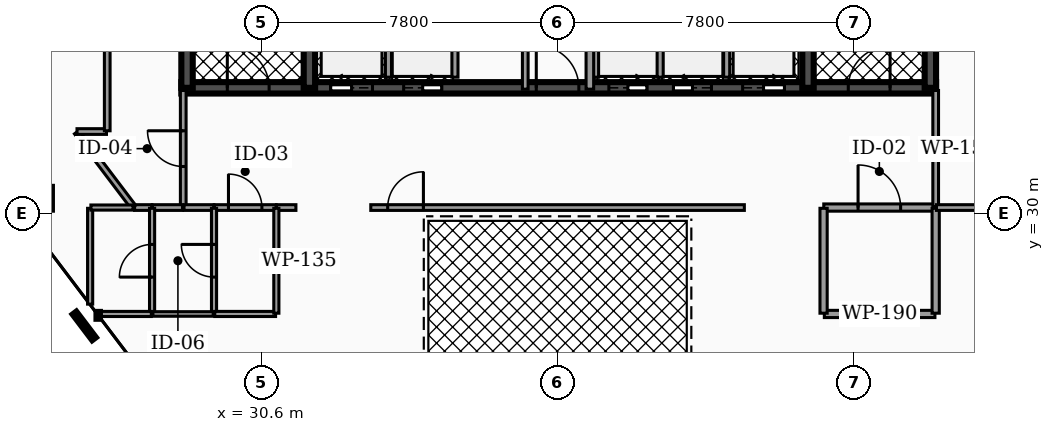
"""IFC4 building model, lengths in metres.
Left out: names, types, materials, properties, quantities, classifications, styles, units other than length and angle.
Written with IfcOpenShell. Run it as: python <this file> out.ifc"""

import sys

from ifc_helpers import new_model, si_unit, direction, frame, frame_2d, origin, place, context, subcontext, project, spatial, rectangle, extrude, element, fill, save


model = new_model("IFC4")
c1 = context("Model", 3, precision=1e-05, world=origin(), true_north=direction((0.0, 1.0)))
c2 = subcontext(c1, "Body", "Model", "MODEL_VIEW")
j1 = project(units=[si_unit("LENGTHUNIT", "METRE"), si_unit("PLANEANGLEUNIT", "RADIAN")], contexts=[c1])
p1 = place(None, origin())
s1 = spatial("IfcSite", under=j1, at=p1, CompositionType="ELEMENT")
p2 = place(p1, origin())
s2 = spatial("IfcBuilding", under=s1, at=p2, CompositionType="ELEMENT")
p3 = place(p2, frame((0.0, 0.0, 242.76)))
s3 = spatial("IfcBuildingStorey", under=s2, at=p3, CompositionType="ELEMENT", Elevation=242.76)
p4 = place(p3, frame((28.5, 33.3, 0.0), z_axis=(0.0, 0.0, 1.0), x_axis=(1.0, 0.0, 0.0)))
e1 = element("IfcWall", 1, at=p4, inside=s3, PredefinedType="SHEAR", context=c2, shape_type="SweptSolid", body=[
    extrude(rectangle(XDim=19.86, YDim=0.3, at=frame_2d((9.93, 0.0))), origin(), (0.0, 0.0, 1.0), 3.18),
])
p5 = place(p4, frame((3.93, 0.0, 0.0)))
e2 = element("IfcOpeningElement", 2, at=p5, cuts=e1, PredefinedType="OPENING", context=c2, shape_type="SweptSolid", body=[
    extrude(rectangle(XDim=1.1, YDim=2.15, at=frame_2d((0.55, 1.075))), frame((0.0, 0.16, 0.0), z_axis=(0.0, -1.0, 0.0), x_axis=(1.0, 0.0, 0.0)), (0.0, 0.0, 1.0), 0.32),
])
p6 = place(p4, frame((14.77, 0.0, 0.0)))
e3 = element("IfcOpeningElement", 3, at=p6, cuts=e1, PredefinedType="OPENING", context=c2, shape_type="SweptSolid", body=[
    extrude(rectangle(XDim=1.1, YDim=2.15, at=frame_2d((0.55, 1.075))), frame((0.0, 0.16, 0.0), z_axis=(0.0, -1.0, 0.0), x_axis=(1.0, 0.0, 0.0)), (0.0, 0.0, 1.0), 0.32),
])
p7 = place(p4, frame((11.25, 0.0, 0.0)))
e4 = element("IfcOpeningElement", 4, at=p7, cuts=e1, PredefinedType="OPENING", context=c2, shape_type="SweptSolid", body=[
    extrude(rectangle(XDim=1.0, YDim=2.1, at=frame_2d((0.5, 1.05))), frame((0.0, 0.16, 0.0), z_axis=(0.0, -1.0, 0.0), x_axis=(1.0, 0.0, 0.0)), (0.0, 0.0, 1.0), 0.32),
])
p8 = place(p4, frame((12.95, 0.0, 0.0)))
e5 = element("IfcOpeningElement", 5, at=p8, cuts=e1, PredefinedType="OPENING", context=c2, shape_type="SweptSolid", body=[
    extrude(rectangle(XDim=1.0, YDim=2.1, at=frame_2d((0.5, 1.05))), frame((0.0, 0.16, 0.0), z_axis=(0.0, -1.0, 0.0), x_axis=(1.0, 0.0, 0.0)), (0.0, 0.0, 1.0), 0.32),
])
p9 = place(p4, frame((5.85, 0.0, 0.0)))
e6 = element("IfcOpeningElement", 6, at=p9, cuts=e1, PredefinedType="OPENING", context=c2, shape_type="SweptSolid", body=[
    extrude(rectangle(XDim=1.0, YDim=2.1, at=frame_2d((0.5, 1.05))), frame((0.0, 0.16, 0.0), z_axis=(0.0, -1.0, 0.0), x_axis=(1.0, 0.0, 0.0)), (0.0, 0.0, 1.0), 0.32),
])
p10 = place(p4, frame((1.21, 0.0, 0.0)))
e7 = element("IfcOpeningElement", 7, at=p10, cuts=e1, PredefinedType="OPENING", context=c2, shape_type="SweptSolid", body=[
    extrude(rectangle(XDim=1.1, YDim=2.2, at=frame_2d((0.55, 1.1))), frame((0.0, 0.16, 0.0), z_axis=(0.0, -1.0, 0.0), x_axis=(1.0, 0.0, 0.0)), (0.0, 0.0, 1.0), 0.32),
])
p11 = place(p4, frame((9.34, 0.0, 0.0)))
e8 = element("IfcOpeningElement", 8, at=p11, cuts=e1, PredefinedType="OPENING", context=c2, shape_type="SweptSolid", body=[
    extrude(rectangle(XDim=1.12, YDim=2.05, at=frame_2d((0.56, 1.025))), frame((0.0, 0.16, 0.0), z_axis=(0.0, -1.0, 0.0), x_axis=(1.0, 0.0, 0.0)), (0.0, 0.0, 1.0), 0.32),
])
p12 = place(p4, frame((17.55, 0.0, 0.0)))
e9 = element("IfcOpeningElement", 9, at=p12, cuts=e1, PredefinedType="OPENING", context=c2, shape_type="SweptSolid", body=[
    extrude(rectangle(XDim=1.1, YDim=2.2, at=frame_2d((0.55, 1.1))), frame((0.0, 0.16, 0.0), z_axis=(0.0, -1.0, 0.0), x_axis=(1.0, 0.0, 0.0)), (0.0, 0.0, 1.0), 0.32),
])
for number, where, z_axis, x_axis in (
    (10, (28.65, 33.3, 0.0), (0.0, 0.0, 1.0), (0.0, 1.0, 0.0)),
    (11, (31.87, 33.3, 0.0), (0.0, 0.0, 1.0), (0.0, 1.0, 0.0)),
    (12, (44.99, 33.3, 0.0), (0.0, 0.0, 1.0), (0.0, 1.0, 0.0)),
    (13, (48.21, 33.3, 0.0), (0.0, 0.0, 1.0), (0.0, 1.0, 0.0)),
):
    element("IfcWall", number, at=place(p3, frame(where, z_axis=z_axis, x_axis=x_axis)), inside=s3, PredefinedType="SHEAR", context=c2, shape_type="SweptSolid", body=[
        extrude(rectangle(XDim=10.1, YDim=0.3, at=frame_2d((5.05, 0.0))), origin(), (0.0, 0.0, 1.0), 3.18),
    ])
for number, where, z_axis, x_axis in (
    (14, (33.95, 33.58, 0.0), (0.0, 0.0, 1.0), (0.0, 1.0, 0.0)),
    (15, (42.85, 33.58, 0.0), (0.0, 0.0, 1.0), (0.0, 1.0, 0.0)),
):
    element("IfcWall", number, at=place(p3, frame(where, z_axis=z_axis, x_axis=x_axis)), inside=s3, PredefinedType="SOLIDWALL", context=c2, shape_type="SweptSolid", body=[
        extrude(rectangle(XDim=2.45, YDim=0.16, at=frame_2d((1.225, 0.0))), origin(), (0.0, 0.0, 1.0), 3.18),
    ])
for number, where, z_axis, x_axis in (
    (16, (39.4, 33.58, 0.0), (0.0, 0.0, 1.0), (0.0, 1.0, 0.0)),
    (17, (41.1, 33.58, 0.0), (0.0, 0.0, 1.0), (0.0, 1.0, 0.0)),
    (18, (35.7, 33.58, 0.0), (0.0, 0.0, 1.0), (0.0, 1.0, 0.0)),
):
    element("IfcWall", number, at=place(p3, frame(where, z_axis=z_axis, x_axis=x_axis)), inside=s3, PredefinedType="SOLIDWALL", context=c2, shape_type="SweptSolid", body=[
        extrude(rectangle(XDim=2.25, YDim=0.16, at=frame_2d((1.125, 0.0))), origin(), (0.0, 0.0, 1.0), 3.18),
    ])
p13 = place(p3, frame((37.55, 33.265, 0.0), z_axis=(0.0, 0.0, 1.0), x_axis=(0.0, 1.0, 0.0)))
e19 = element("IfcWall", 19, at=p13, inside=s3, PredefinedType="PARTITIONING", context=c2, shape_type="SweptSolid", body=[
    extrude(rectangle(XDim=3.615, YDim=0.15, at=frame_2d((1.808, 0.0))), origin(), (0.0, 0.0, 1.0), 2.235),
])
p14 = place(p13, frame((1.337, 0.0, 0.0)))
e20 = element("IfcOpeningElement", 20, at=p14, cuts=e19, PredefinedType="OPENING", context=c2, shape_type="SweptSolid", body=[
    extrude(rectangle(XDim=0.94, YDim=2.05, at=frame_2d((0.47, 1.025))), frame((0.0, 0.085, 0.0), z_axis=(0.0, -1.0, 0.0), x_axis=(1.0, 0.0, 0.0)), (0.0, 0.0, 1.0), 0.17),
])
p15 = place(p3, frame((39.25, 33.265, 0.0), z_axis=(0.0, 0.0, 1.0), x_axis=(0.0, 1.0, 0.0)))
e21 = element("IfcWall", 21, at=p15, inside=s3, PredefinedType="PARTITIONING", context=c2, shape_type="SweptSolid", body=[
    extrude(rectangle(XDim=3.615, YDim=0.2, at=frame_2d((1.808, 0.0))), origin(), (0.0, 0.0, 1.0), 2.235),
])
p16 = place(p3, frame((45.405, 30.15, 0.0), z_axis=(0.0, 0.0, 1.0), x_axis=(1.0, 0.0, 0.0)))
e22 = element("IfcWall", 22, at=p16, inside=s3, PredefinedType="PARTITIONING", context=c2, shape_type="SweptSolid", body=[
    extrude(rectangle(XDim=2.925, YDim=0.19, at=frame_2d((1.462, 0.0))), origin(), (0.0, 0.0, 1.0), 2.235),
])
p17 = place(p16, frame((0.903, 0.0, 0.0)))
e23 = element("IfcOpeningElement", 23, at=p17, cuts=e22, PredefinedType="OPENING", context=c2, shape_type="SweptSolid", body=[
    extrude(rectangle(XDim=1.12, YDim=2.05, at=frame_2d((0.56, 1.025))), frame((0.0, 0.105, 0.0), z_axis=(0.0, -1.0, 0.0), x_axis=(1.0, 0.0, 0.0)), (0.0, 0.0, 1.0), 0.21),
])
p18 = place(p3, frame((28.55, 30.17, 0.0), z_axis=(0.0, 0.0, 1.0), x_axis=(0.0, 1.0, 0.0)))
e24 = element("IfcWall", 24, at=p18, inside=s3, PredefinedType="PARTITIONING", context=c2, shape_type="SweptSolid", body=[
    extrude(rectangle(XDim=3.06, YDim=0.15, at=frame_2d((1.53, 0.0))), origin(), (0.0, 0.0, 1.0), 2.235),
])
p19 = place(p18, frame((1.06, 0.0, 0.0)))
e25 = element("IfcOpeningElement", 25, at=p19, cuts=e24, PredefinedType="OPENING", context=c2, shape_type="SweptSolid", body=[
    extrude(rectangle(XDim=0.94, YDim=2.05, at=frame_2d((0.47, 1.025))), frame((0.0, 0.085, 0.0), z_axis=(0.0, -1.0, 0.0), x_axis=(1.0, 0.0, 0.0)), (0.0, 0.0, 1.0), 0.17),
])
p20 = place(p3, frame((48.35, 30.17, 0.0), z_axis=(0.0, 0.0, 1.0), x_axis=(0.0, 1.0, 0.0)))
e26 = element("IfcWall", 26, at=p20, inside=s3, PredefinedType="PARTITIONING", context=c2, shape_type="SweptSolid", body=[
    extrude(rectangle(XDim=3.06, YDim=0.15, at=frame_2d((1.53, 0.0))), origin(), (0.0, 0.0, 1.0), 2.235),
])
p21 = place(p3, frame((29.365, 30.15, 0.0), z_axis=(0.0, 0.0, 1.0), x_axis=(1.0, 0.0, 0.0)))
e27 = element("IfcWall", 27, at=p21, inside=s3, PredefinedType="PARTITIONING", context=c2, shape_type="SweptSolid", body=[
    extrude(rectangle(XDim=1.63, YDim=0.15, at=frame_2d((0.815, 0.0))), origin(), (0.0, 0.0, 1.0), 2.235),
])
p22 = place(p21, frame((0.375, 0.0, 0.0)))
e28 = element("IfcOpeningElement", 28, at=p22, cuts=e27, PredefinedType="OPENING", context=c2, shape_type="SweptSolid", body=[
    extrude(rectangle(XDim=0.88, YDim=2.05, at=frame_2d((0.44, 1.025))), frame((0.0, 0.085, 0.0), z_axis=(0.0, -1.0, 0.0), x_axis=(1.0, 0.0, 0.0)), (0.0, 0.0, 1.0), 0.17),
])
p23 = place(p3, frame((28.57, 30.15, 0.0), z_axis=(0.0, 0.0, 1.0), x_axis=(1.0, 0.0, 0.0)))
e29 = element("IfcWall", 29, at=p23, inside=s3, PredefinedType="PARTITIONING", context=c2, shape_type="SweptSolid", body=[
    extrude(rectangle(XDim=0.785, YDim=0.15, at=frame_2d((0.393, 0.0))), origin(), (0.0, 0.0, 1.0), 2.235),
])
p24 = place(p3, frame((33.485, 30.15, 0.0), z_axis=(0.0, 0.0, 1.0), x_axis=(1.0, 0.0, 0.0)))
e30 = element("IfcWall", 30, at=p24, inside=s3, PredefinedType="PARTITIONING", context=c2, shape_type="SweptSolid", body=[
    extrude(rectangle(XDim=9.83, YDim=0.15, at=frame_2d((4.915, 0.0))), origin(), (0.0, 0.0, 1.0), 2.235),
])
p25 = place(p24, frame((0.445, 0.0, 0.0)))
e31 = element("IfcOpeningElement", 31, at=p25, cuts=e30, PredefinedType="OPENING", context=c2, shape_type="SweptSolid", body=[
    extrude(rectangle(XDim=0.94, YDim=2.05, at=frame_2d((0.47, 1.025))), frame((0.0, 0.085, 0.0), z_axis=(0.0, -1.0, 0.0), x_axis=(1.0, 0.0, 0.0)), (0.0, 0.0, 1.0), 0.17),
])
p26 = place(p3, frame((31.005, 30.15, 0.0), z_axis=(0.0, 0.0, 1.0), x_axis=(1.0, 0.0, 0.0)))
e32 = element("IfcWall", 32, at=p26, inside=s3, PredefinedType="PARTITIONING", context=c2, shape_type="SweptSolid", body=[
    extrude(rectangle(XDim=0.51, YDim=0.15, at=frame_2d((0.255, 0.0))), origin(), (0.0, 0.0, 1.0), 2.235),
])
p27 = place(p3, frame((45.42, 27.35, 0.0), z_axis=(0.0, 0.0, 1.0), x_axis=(1.0, 0.0, 0.0)))
e33 = element("IfcWall", 33, at=p27, inside=s3, PredefinedType="PARTITIONING", context=c2, shape_type="SweptSolid", body=[
    extrude(rectangle(XDim=2.91, YDim=0.19, at=frame_2d((1.455, 0.0))), origin(), (0.0, 0.0, 1.0), 2.235),
])
for number, where, z_axis, x_axis in (
    (34, (45.4, 27.37, 0.0), (0.0, 0.0, 1.0), (0.0, 1.0, 0.0)),
    (35, (48.35, 27.37, 0.0), (0.0, 0.0, 1.0), (0.0, 1.0, 0.0)),
):
    element("IfcWall", number, at=place(p3, frame(where, z_axis=z_axis, x_axis=x_axis)), inside=s3, PredefinedType="PARTITIONING", context=c2, shape_type="SweptSolid", body=[
        extrude(rectangle(XDim=2.76, YDim=0.19, at=frame_2d((1.38, 0.0))), origin(), (0.0, 0.0, 1.0), 2.235),
    ])
p28 = place(p3, frame((27.27, 30.15, 0.0), z_axis=(0.0, 0.0, 1.0), x_axis=(1.0, 0.0, 0.0)))
e36 = element("IfcWall", 36, at=p28, inside=s3, PredefinedType="PARTITIONING", context=c2, shape_type="SweptSolid", body=[
    extrude(rectangle(XDim=0.455, YDim=0.15, at=frame_2d((0.228, 0.0))), origin(), (0.0, 0.0, 1.0), 2.235),
])
p29 = place(p3, frame((27.735, 30.15, 0.0), z_axis=(0.0, 0.0, 1.0), x_axis=(1.0, 0.0, 0.0)))
e37 = element("IfcWall", 37, at=p29, inside=s3, PredefinedType="PARTITIONING", context=c2, shape_type="SweptSolid", body=[
    extrude(rectangle(XDim=0.795, YDim=0.15, at=frame_2d((0.397, 0.0))), origin(), (0.0, 0.0, 1.0), 2.235),
])
p30 = place(p3, frame((48.37, 30.15, 0.0), z_axis=(0.0, 0.0, 1.0), x_axis=(1.0, 0.0, 0.0)))
e38 = element("IfcWall", 38, at=p30, inside=s3, PredefinedType="PARTITIONING", context=c2, shape_type="SweptSolid", body=[
    extrude(rectangle(XDim=1.16, YDim=0.15, at=frame_2d((0.58, 0.0))), origin(), (0.0, 0.0, 1.0), 2.235),
])
p31 = place(p3, frame((25.747, 32.134, 0.0), z_axis=(0.0, 0.0, 1.0), x_axis=(0.603931928578, -0.797035899847, 0.0)))
e39 = element("IfcWall", 39, at=p31, inside=s3, PredefinedType="PARTITIONING", context=c2, shape_type="SweptSolid", body=[
    extrude(rectangle(XDim=2.469, YDim=0.15, at=frame_2d((1.235, 0.0))), origin(), (0.0, 0.0, 1.0), 2.235),
])
p32 = place(p3, frame((25.755, 32.15, 0.0), z_axis=(0.0, 0.0, 1.0), x_axis=(1.0, 0.0, 0.0)))
e40 = element("IfcWall", 40, at=p32, inside=s3, PredefinedType="PARTITIONING", context=c2, shape_type="SweptSolid", body=[
    extrude(rectangle(XDim=0.775, YDim=0.15, at=frame_2d((0.388, 0.0))), origin(), (0.0, 0.0, 1.0), 2.235),
])
p33 = place(p3, frame((26.55, 32.17, 0.0), z_axis=(0.0, 0.0, 1.0), x_axis=(0.0, 1.0, 0.0)))
e41 = element("IfcWall", 41, at=p33, inside=s3, PredefinedType="PARTITIONING", context=c2, shape_type="SweptSolid", body=[
    extrude(rectangle(XDim=11.38, YDim=0.15, at=frame_2d((5.69, 0.0))), origin(), (0.0, 0.0, 1.0), 2.235),
])
p34 = place(p33, frame((5.22, 0.0, 0.0)))
e42 = element("IfcOpeningElement", 42, at=p34, cuts=e41, PredefinedType="OPENING", context=c2, shape_type="SweptSolid", body=[
    extrude(rectangle(XDim=0.94, YDim=2.05, at=frame_2d((0.47, 1.025))), frame((0.0, 0.085, 0.0), z_axis=(0.0, -1.0, 0.0), x_axis=(1.0, 0.0, 0.0)), (0.0, 0.0, 1.0), 0.17),
])
p35 = place(p3, frame((29.36, 27.37, 0.0), z_axis=(0.0, 0.0, 1.0), x_axis=(0.0, 1.0, 0.0)))
e43 = element("IfcWall", 43, at=p35, inside=s3, PredefinedType="PARTITIONING", context=c2, shape_type="SweptSolid", body=[
    extrude(rectangle(XDim=2.76, YDim=0.135, at=frame_2d((1.38, 0.0))), origin(), (0.0, 0.0, 1.0), 2.235),
])
p36 = place(p35, frame((0.95, 0.0, 0.0)))
e44 = element("IfcOpeningElement", 44, at=p36, cuts=e43, PredefinedType="OPENING", context=c2, shape_type="SweptSolid", body=[
    extrude(rectangle(XDim=0.86, YDim=2.05, at=frame_2d((0.43, 1.025))), frame((0.0, 0.077, 0.0), z_axis=(0.0, -1.0, 0.0), x_axis=(1.0, 0.0, 0.0)), (0.0, 0.0, 1.0), 0.155),
])
p37 = place(p3, frame((29.38, 27.35, 0.0), z_axis=(0.0, 0.0, 1.0), x_axis=(1.0, 0.0, 0.0)))
e45 = element("IfcWall", 45, at=p37, inside=s3, PredefinedType="PARTITIONING", context=c2, shape_type="SweptSolid", body=[
    extrude(rectangle(XDim=1.6, YDim=0.135, at=frame_2d((0.8, 0.0))), origin(), (0.0, 0.0, 1.0), 2.235),
])
p38 = place(p3, frame((31.0, 27.37, 0.0), z_axis=(0.0, 0.0, 1.0), x_axis=(0.0, 1.0, 0.0)))
e46 = element("IfcWall", 46, at=p38, inside=s3, PredefinedType="PARTITIONING", context=c2, shape_type="SweptSolid", body=[
    extrude(rectangle(XDim=2.76, YDim=0.135, at=frame_2d((1.38, 0.0))), origin(), (0.0, 0.0, 1.0), 2.235),
])
p39 = place(p3, frame((27.73, 27.37, 0.0), z_axis=(0.0, 0.0, 1.0), x_axis=(0.0, 1.0, 0.0)))
e47 = element("IfcWall", 47, at=p39, inside=s3, PredefinedType="PARTITIONING", context=c2, shape_type="SweptSolid", body=[
    extrude(rectangle(XDim=2.76, YDim=0.135, at=frame_2d((1.38, 0.0))), origin(), (0.0, 0.0, 1.0), 2.235),
])
p40 = place(p39, frame((0.95, 0.0, 0.0)))
e48 = element("IfcOpeningElement", 48, at=p40, cuts=e47, PredefinedType="OPENING", context=c2, shape_type="SweptSolid", body=[
    extrude(rectangle(XDim=0.86, YDim=2.05, at=frame_2d((0.43, 1.025))), frame((0.0, 0.077, 0.0), z_axis=(0.0, -1.0, 0.0), x_axis=(1.0, 0.0, 0.0)), (0.0, 0.0, 1.0), 0.155),
])
p41 = place(p3, frame((26.3, 27.35, 0.0), z_axis=(0.0, 0.0, 1.0), x_axis=(1.0, 0.0, 0.0)))
e49 = element("IfcWall", 49, at=p41, inside=s3, PredefinedType="PARTITIONING", context=c2, shape_type="SweptSolid", body=[
    extrude(rectangle(XDim=1.41, YDim=0.135, at=frame_2d((0.705, 0.0))), origin(), (0.0, 0.0, 1.0), 2.235),
])
p42 = place(p3, frame((26.1, 27.609, 0.0), z_axis=(0.0, 0.0, 1.0), x_axis=(0.0, 1.0, 0.0)))
e50 = element("IfcWall", 50, at=p42, inside=s3, PredefinedType="PARTITIONING", context=c2, shape_type="SweptSolid", body=[
    extrude(rectangle(XDim=2.521, YDim=0.135, at=frame_2d((1.26, 0.0))), origin(), (0.0, 0.0, 1.0), 2.235),
])
p43 = place(p3, frame((26.12, 30.15, 0.0), z_axis=(0.0, 0.0, 1.0), x_axis=(1.0, 0.0, 0.0)))
e51 = element("IfcWall", 51, at=p43, inside=s3, PredefinedType="PARTITIONING", context=c2, shape_type="SweptSolid", body=[
    extrude(rectangle(XDim=1.11, YDim=0.135, at=frame_2d((0.555, 0.0))), origin(), (0.0, 0.0, 1.0), 2.235),
])
p44 = place(p3, frame((27.75, 27.35, 0.0), z_axis=(0.0, 0.0, 1.0), x_axis=(1.0, 0.0, 0.0)))
e52 = element("IfcWall", 52, at=p44, inside=s3, PredefinedType="PARTITIONING", context=c2, shape_type="SweptSolid", body=[
    extrude(rectangle(XDim=1.59, YDim=0.12, at=frame_2d((0.795, 0.0))), origin(), (0.0, 0.0, 1.0), 2.235),
])
p45 = place(p5, origin())
e53 = element("IfcDoor", 53, at=p45, inside=s3, OperationType="SLIDING_TO_LEFT", PredefinedType="DOOR", context=c2, shape_type="SweptSolid", body=[
    extrude(rectangle(XDim=1.1, YDim=2.15, at=frame_2d((0.55, 1.075))), frame((0.0, 0.025, 0.0), z_axis=(0.0, -1.0, 0.0), x_axis=(1.0, 0.0, 0.0)), (0.0, 0.0, 1.0), 0.05),
])
fill(e2, e53)
p46 = place(p6, origin())
e54 = element("IfcDoor", 54, at=p46, inside=s3, OperationType="SLIDING_TO_RIGHT", PredefinedType="DOOR", context=c2, shape_type="SweptSolid", body=[
    extrude(rectangle(XDim=1.1, YDim=2.15, at=frame_2d((0.55, 1.075))), frame((0.0, 0.025, 0.0), z_axis=(0.0, -1.0, 0.0), x_axis=(1.0, 0.0, 0.0)), (0.0, 0.0, 1.0), 0.05),
])
fill(e3, e54)
p47 = place(p7, origin())
e55 = element("IfcDoor", 55, at=p47, inside=s3, OperationType="SLIDING_TO_RIGHT", PredefinedType="DOOR", context=c2, shape_type="SweptSolid", body=[
    extrude(rectangle(XDim=1.0, YDim=2.1, at=frame_2d((0.5, 1.05))), frame((0.0, 0.025, 0.0), z_axis=(0.0, -1.0, 0.0), x_axis=(1.0, 0.0, 0.0)), (0.0, 0.0, 1.0), 0.05),
])
fill(e4, e55)
p48 = place(p8, origin())
e56 = element("IfcDoor", 56, at=p48, inside=s3, OperationType="SLIDING_TO_LEFT", PredefinedType="DOOR", context=c2, shape_type="SweptSolid", body=[
    extrude(rectangle(XDim=1.0, YDim=2.1, at=frame_2d((0.5, 1.05))), frame((0.0, 0.025, 0.0), z_axis=(0.0, -1.0, 0.0), x_axis=(1.0, 0.0, 0.0)), (0.0, 0.0, 1.0), 0.05),
])
fill(e5, e56)
p49 = place(p9, origin())
e57 = element("IfcDoor", 57, at=p49, inside=s3, OperationType="SLIDING_TO_RIGHT", PredefinedType="DOOR", context=c2, shape_type="SweptSolid", body=[
    extrude(rectangle(XDim=1.0, YDim=2.1, at=frame_2d((0.5, 1.05))), frame((0.0, 0.025, 0.0), z_axis=(0.0, -1.0, 0.0), x_axis=(1.0, 0.0, 0.0)), (0.0, 0.0, 1.0), 0.05),
])
fill(e6, e57)
p50 = place(p10, origin())
e58 = element("IfcDoor", 58, at=p50, inside=s3, OperationType="SINGLE_SWING_LEFT", PredefinedType="DOOR", context=c2, shape_type="SweptSolid", body=[
    extrude(rectangle(XDim=1.1, YDim=2.2, at=frame_2d((0.55, 1.1))), frame((0.0, 0.025, 0.0), z_axis=(0.0, -1.0, 0.0), x_axis=(1.0, 0.0, 0.0)), (0.0, 0.0, 1.0), 0.05),
])
fill(e7, e58)
p51 = place(p11, origin())
e59 = element("IfcDoor", 59, at=p51, inside=s3, OperationType="SINGLE_SWING_LEFT", PredefinedType="DOOR", context=c2, shape_type="SweptSolid", body=[
    extrude(rectangle(XDim=1.12, YDim=2.05, at=frame_2d((0.56, 1.025))), frame((0.0, 0.025, 0.0), z_axis=(0.0, -1.0, 0.0), x_axis=(1.0, 0.0, 0.0)), (0.0, 0.0, 1.0), 0.05),
])
fill(e8, e59)
p52 = place(p12, origin())
e60 = element("IfcDoor", 60, at=p52, inside=s3, OperationType="SINGLE_SWING_RIGHT", PredefinedType="DOOR", context=c2, shape_type="SweptSolid", body=[
    extrude(rectangle(XDim=1.1, YDim=2.2, at=frame_2d((0.55, 1.1))), frame((0.0, 0.025, 0.0), z_axis=(0.0, -1.0, 0.0), x_axis=(1.0, 0.0, 0.0)), (0.0, 0.0, 1.0), 0.05),
])
fill(e9, e60)
p53 = place(p17, origin())
e61 = element("IfcDoor", 61, at=p53, inside=s3, OperationType="SINGLE_SWING_LEFT", PredefinedType="DOOR", context=c2, shape_type="SweptSolid", body=[
    extrude(rectangle(XDim=1.12, YDim=2.05, at=frame_2d((0.56, 1.025))), frame((0.0, 0.025, 0.0), z_axis=(0.0, -1.0, 0.0), x_axis=(1.0, 0.0, 0.0)), (0.0, 0.0, 1.0), 0.05),
])
fill(e23, e61)
p54 = place(p19, origin())
e62 = element("IfcDoor", 62, at=p54, inside=s3, OperationType="SINGLE_SWING_RIGHT", PredefinedType="DOOR", context=c2, shape_type="SweptSolid", body=[
    extrude(rectangle(XDim=0.94, YDim=2.05, at=frame_2d((0.47, 1.025))), frame((0.0, 0.025, 0.0), z_axis=(0.0, -1.0, 0.0), x_axis=(1.0, 0.0, 0.0)), (0.0, 0.0, 1.0), 0.05),
])
fill(e25, e62)
p55 = place(p22, origin())
e63 = element("IfcDoor", 63, at=p55, inside=s3, OperationType="SINGLE_SWING_LEFT", PredefinedType="DOOR", context=c2, shape_type="SweptSolid", body=[
    extrude(rectangle(XDim=0.88, YDim=2.05, at=frame_2d((0.44, 1.025))), frame((0.0, 0.025, 0.0), z_axis=(0.0, -1.0, 0.0), x_axis=(1.0, 0.0, 0.0)), (0.0, 0.0, 1.0), 0.05),
])
fill(e28, e63)
p56 = place(p25, origin())
e64 = element("IfcDoor", 64, at=p56, inside=s3, OperationType="SINGLE_SWING_RIGHT", PredefinedType="DOOR", context=c2, shape_type="SweptSolid", body=[
    extrude(rectangle(XDim=0.94, YDim=2.05, at=frame_2d((0.47, 1.025))), frame((0.0, 0.025, 0.0), z_axis=(0.0, -1.0, 0.0), x_axis=(1.0, 0.0, 0.0)), (0.0, 0.0, 1.0), 0.05),
])
fill(e31, e64)
p57 = place(p36, origin())
e65 = element("IfcDoor", 65, at=p57, inside=s3, OperationType="SINGLE_SWING_RIGHT", PredefinedType="DOOR", context=c2, shape_type="SweptSolid", body=[
    extrude(rectangle(XDim=0.86, YDim=2.05, at=frame_2d((0.43, 1.025))), frame((0.0, 0.025, 0.0), z_axis=(0.0, -1.0, 0.0), x_axis=(1.0, 0.0, 0.0)), (0.0, 0.0, 1.0), 0.05),
])
fill(e44, e65)
p58 = place(p40, origin())
e66 = element("IfcDoor", 66, at=p58, inside=s3, OperationType="SINGLE_SWING_LEFT", PredefinedType="DOOR", context=c2, shape_type="SweptSolid", body=[
    extrude(rectangle(XDim=0.86, YDim=2.05, at=frame_2d((0.43, 1.025))), frame((0.0, 0.025, 0.0), z_axis=(0.0, -1.0, 0.0), x_axis=(1.0, 0.0, 0.0)), (0.0, 0.0, 1.0), 0.05),
])
fill(e48, e66)
save(model, sys.argv[1])
